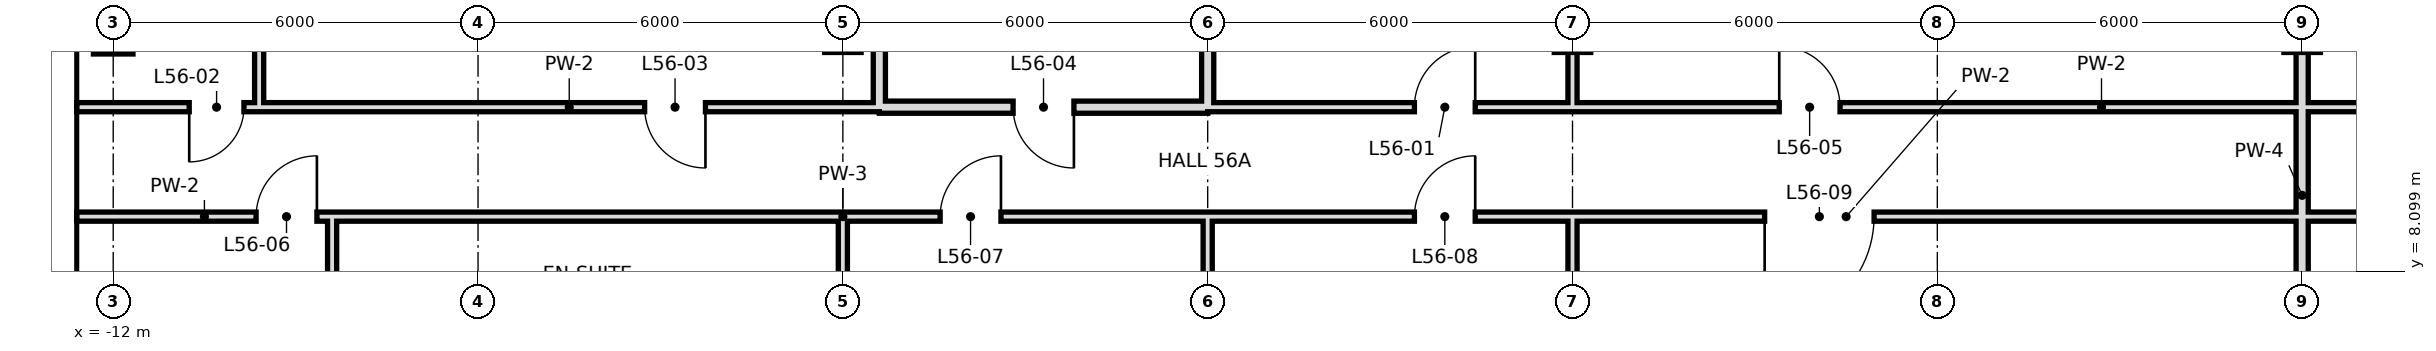
"""IFC4 building model, lengths in metres.
Left out: names, types, materials, properties, quantities, classifications, styles, units other than length and angle.
Written with IfcOpenShell. Run it as: python <this file> out.ifc"""

import sys

from ifc_helpers import new_model, si_unit, direction, frame, frame_2d, origin, origin_2d, place, context, subcontext, project, spatial, rectangle, hollow_rectangle, extrude, element, fill, save


model = new_model("IFC4")
c1 = context("Model", 3, precision=1e-05, world=origin(), true_north=direction((0.0, 1.0)))
c2 = subcontext(c1, "Body", "Model", "MODEL_VIEW")
j1 = project(units=[si_unit("LENGTHUNIT", "METRE"), si_unit("PLANEANGLEUNIT", "RADIAN")], contexts=[c1])
p1 = place(None, origin())
s1 = spatial("IfcSite", under=j1, at=p1, CompositionType="ELEMENT")
p2 = place(p1, origin())
s2 = spatial("IfcBuilding", under=s1, at=p2, CompositionType="ELEMENT")
p3 = place(p2, frame((0.0, 0.0, 239.6)))
s3 = spatial("IfcBuildingStorey", under=s2, at=p3, CompositionType="ELEMENT", Elevation=239.6)
p4 = place(p3, frame((-12.0, 12.0, 0.0), z_axis=(0.0, 0.0, 1.0), x_axis=(1.0, 0.0, 0.0)))
e1 = element("IfcColumn", 1, at=p4, inside=s3, PredefinedType="COLUMN", context=c2, shape_type="SweptSolid", body=[
    extrude(hollow_rectangle(XDim=0.65, YDim=0.65, WallThickness=0.032, at=origin_2d()), origin(), (0.0, 0.0, 1.0), 3.6),
])
p5 = place(p3, frame((-8.4, 6.0, 0.0), z_axis=(0.0, 0.0, 1.0), x_axis=(0.0, 1.0, 0.0)))
e2 = element("IfcWall", 2, at=p5, inside=s3, PredefinedType="PARTITIONING", context=c2, shape_type="SweptSolid", body=[
    extrude(rectangle(XDim=3.0, YDim=0.15, at=frame_2d((1.5, 0.0))), origin(), (0.0, 0.0, 1.0), 3.42),
])
p6 = place(p3, frame((-9.6, 10.8, 0.0), z_axis=(0.0, 0.0, 1.0), x_axis=(0.0, 1.0, 0.0)))
e3 = element("IfcWall", 3, at=p6, inside=s3, PredefinedType="PARTITIONING", context=c2, shape_type="SweptSolid", body=[
    extrude(rectangle(XDim=7.2, YDim=0.15, at=frame_2d((3.6, 0.0))), origin(), (0.0, 0.0, 1.0), 3.42),
])
p7 = place(p3, frame((0.0, 6.0, 0.0), z_axis=(0.0, 0.0, 1.0), x_axis=(0.0, 1.0, 0.0)))
e4 = element("IfcWall", 4, at=p7, inside=s3, PredefinedType="PARTITIONING", context=c2, shape_type="SweptSolid", body=[
    extrude(rectangle(XDim=3.0, YDim=0.15, at=frame_2d((1.5, 0.0))), origin(), (0.0, 0.0, 1.0), 2.72),
])
p8 = place(p3, frame((0.6, 10.8, 0.0), z_axis=(0.0, 0.0, 1.0), x_axis=(0.0, 1.0, 0.0)))
e5 = element("IfcWall", 5, at=p8, inside=s3, PredefinedType="SOLIDWALL", context=c2, shape_type="SweptSolid", body=[
    extrude(rectangle(XDim=7.2, YDim=0.2, at=frame_2d((3.6, 0.0))), origin(), (0.0, 0.0, 1.0), 2.72),
])
p9 = place(p3, frame((12.0, 0.0, 0.0), z_axis=(0.0, 0.0, 1.0), x_axis=(0.0, 1.0, 0.0)))
e6 = element("IfcWall", 6, at=p9, inside=s3, PredefinedType="PARTITIONING", context=c2, shape_type="SweptSolid", body=[
    extrude(rectangle(XDim=9.0, YDim=0.15, at=frame_2d((4.5, 0.0))), origin(), (0.0, 0.0, 1.0), 2.72),
])
p10 = place(p3, frame((12.0, 10.8, 0.0), z_axis=(0.0, 0.0, 1.0), x_axis=(0.0, 1.0, 0.0)))
e7 = element("IfcWall", 7, at=p10, inside=s3, PredefinedType="PARTITIONING", context=c2, shape_type="SweptSolid", body=[
    extrude(rectangle(XDim=7.9, YDim=0.15, at=frame_2d((3.95, 0.0))), origin(), (0.0, 0.0, 1.0), 2.72),
])
p11 = place(p3, frame((24.0, 0.0, 0.0), z_axis=(0.0, 0.0, 1.0), x_axis=(0.0, 1.0, 0.0)))
e8 = element("IfcWall", 8, at=p11, inside=s3, PredefinedType="SOLIDWALL", context=c2, shape_type="SweptSolid", body=[
    extrude(rectangle(XDim=18.7, YDim=0.2, at=frame_2d((9.35, 0.0))), origin(), (0.0, 0.0, 1.0), 2.72),
])
p12 = place(p3, frame((6.0, 10.8, 0.0), z_axis=(0.0, 0.0, 1.0), x_axis=(0.0, 1.0, 0.0)))
e9 = element("IfcWall", 9, at=p12, inside=s3, PredefinedType="SOLIDWALL", context=c2, shape_type="SweptSolid", body=[
    extrude(rectangle(XDim=7.9, YDim=0.2, at=frame_2d((3.95, 0.0))), origin(), (0.0, 0.0, 1.0), 2.72),
])
p13 = place(p3, frame((6.0, -0.6, 0.0), z_axis=(0.0, 0.0, 1.0), x_axis=(0.0, 1.0, 0.0)))
e10 = element("IfcWall", 10, at=p13, inside=s3, PredefinedType="PARTITIONING", context=c2, shape_type="SweptSolid", body=[
    extrude(rectangle(XDim=9.6, YDim=0.15, at=frame_2d((4.8, 0.0))), origin(), (0.0, 0.0, 1.0), 2.72),
])
p14 = place(p3, frame((0.6, 10.8, 0.0), z_axis=(0.0, 0.0, 1.0), x_axis=(1.0, 0.0, 0.0)))
e11 = element("IfcWall", 11, at=p14, inside=s3, PredefinedType="SOLIDWALL", context=c2, shape_type="SweptSolid", body=[
    extrude(rectangle(XDim=5.4, YDim=0.2, at=frame_2d((2.7, 0.0))), origin(), (0.0, 0.0, 1.0), 2.72),
])
p15 = place(p14, frame((2.2, 0.0, 0.0)))
e12 = element("IfcOpeningElement", 12, at=p15, cuts=e11, PredefinedType="OPENING", context=c2, shape_type="SweptSolid", body=[
    extrude(rectangle(XDim=1.0, YDim=2.4, at=frame_2d((0.5, 1.2))), frame((0.0, 0.11, 0.0), z_axis=(0.0, -1.0, 0.0), x_axis=(1.0, 0.0, 0.0)), (0.0, 0.0, 1.0), 0.22),
])
p16 = place(p3, frame((-9.6, 10.8, 0.0), z_axis=(0.0, 0.0, 1.0), x_axis=(1.0, 0.0, 0.0)))
e13 = element("IfcWall", 13, at=p16, inside=s3, PredefinedType="PARTITIONING", context=c2, shape_type="SweptSolid", body=[
    extrude(rectangle(XDim=10.2, YDim=0.15, at=frame_2d((5.1, 0.0))), origin(), (0.0, 0.0, 1.0), 3.42),
])
p17 = place(p16, frame((6.34, 0.0, 0.0)))
e14 = element("IfcOpeningElement", 14, at=p17, cuts=e13, PredefinedType="OPENING", context=c2, shape_type="SweptSolid", body=[
    extrude(rectangle(XDim=1.0, YDim=2.4, at=frame_2d((0.5, 1.2))), frame((0.0, 0.085, 0.0), z_axis=(0.0, -1.0, 0.0), x_axis=(1.0, 0.0, 0.0)), (0.0, 0.0, 1.0), 0.17),
])
p18 = place(p3, frame((6.0, 10.8, 0.0), z_axis=(0.0, 0.0, 1.0), x_axis=(1.0, 0.0, 0.0)))
e15 = element("IfcWall", 15, at=p18, inside=s3, PredefinedType="PARTITIONING", context=c2, shape_type="SweptSolid", body=[
    extrude(rectangle(XDim=29.4, YDim=0.15, at=frame_2d((14.7, 0.0))), origin(), (0.0, 0.0, 1.0), 3.42),
])
p19 = place(p18, frame((3.4, 0.0, 0.0)))
e16 = element("IfcOpeningElement", 16, at=p19, cuts=e15, PredefinedType="OPENING", context=c2, shape_type="SweptSolid", body=[
    extrude(rectangle(XDim=1.0, YDim=2.4, at=frame_2d((0.5, 1.2))), frame((0.0, 0.085, 0.0), z_axis=(0.0, -1.0, 0.0), x_axis=(1.0, 0.0, 0.0)), (0.0, 0.0, 1.0), 0.17),
])
p20 = place(p18, frame((9.4, 0.0, 0.0)))
e17 = element("IfcOpeningElement", 17, at=p20, cuts=e15, PredefinedType="OPENING", context=c2, shape_type="SweptSolid", body=[
    extrude(rectangle(XDim=1.0, YDim=2.4, at=frame_2d((0.5, 1.2))), frame((0.0, 0.085, 0.0), z_axis=(0.0, -1.0, 0.0), x_axis=(1.0, 0.0, 0.0)), (0.0, 0.0, 1.0), 0.17),
])
p21 = place(p18, frame((19.3, 0.0, 0.0)))
e18 = element("IfcOpeningElement", 18, at=p21, cuts=e15, PredefinedType="OPENING", context=c2, shape_type="SweptSolid", body=[
    extrude(rectangle(XDim=1.0, YDim=2.4, at=frame_2d((0.5, 1.2))), frame((0.0, 0.085, 0.0), z_axis=(0.0, -1.0, 0.0), x_axis=(1.0, 0.0, 0.0)), (0.0, 0.0, 1.0), 0.17),
])
p22 = place(p18, frame((25.0, 0.0, 0.0)))
e19 = element("IfcOpeningElement", 19, at=p22, cuts=e15, PredefinedType="OPENING", context=c2, shape_type="SweptSolid", body=[
    extrude(rectangle(XDim=1.0, YDim=2.4, at=frame_2d((0.5, 1.2))), frame((0.0, 0.085, 0.0), z_axis=(0.0, -1.0, 0.0), x_axis=(1.0, 0.0, 0.0)), (0.0, 0.0, 1.0), 0.17),
])
p23 = place(p3, frame((-12.6, 10.8, 0.0), z_axis=(0.0, 0.0, 1.0), x_axis=(1.0, 0.0, 0.0)))
e20 = element("IfcWall", 20, at=p23, inside=s3, PredefinedType="PARTITIONING", context=c2, shape_type="SweptSolid", body=[
    extrude(rectangle(XDim=3.0, YDim=0.15, at=frame_2d((1.5, 0.0))), origin(), (0.0, 0.0, 1.0), 3.42),
])
p24 = place(p23, frame((1.85, 0.0, 0.0)))
e21 = element("IfcOpeningElement", 21, at=p24, cuts=e20, PredefinedType="OPENING", context=c2, shape_type="SweptSolid", body=[
    extrude(rectangle(XDim=0.9, YDim=2.4, at=frame_2d((0.45, 1.2))), frame((0.0, 0.085, 0.0), z_axis=(0.0, -1.0, 0.0), x_axis=(1.0, 0.0, 0.0)), (0.0, 0.0, 1.0), 0.17),
])
p25 = place(p3, frame((-12.6, 9.0, 0.0), z_axis=(0.0, 0.0, 1.0), x_axis=(1.0, 0.0, 0.0)))
e22 = element("IfcWall", 22, at=p25, inside=s3, PredefinedType="PARTITIONING", context=c2, shape_type="SweptSolid", body=[
    extrude(rectangle(XDim=4.2, YDim=0.15, at=frame_2d((2.1, 0.0))), origin(), (0.0, 0.0, 1.0), 3.42),
])
p26 = place(p25, frame((2.95, 0.0, 0.0)))
e23 = element("IfcOpeningElement", 23, at=p26, cuts=e22, PredefinedType="OPENING", context=c2, shape_type="SweptSolid", body=[
    extrude(rectangle(XDim=1.0, YDim=2.4, at=frame_2d((0.5, 1.2))), frame((0.0, 0.085, 0.0), z_axis=(0.0, -1.0, 0.0), x_axis=(1.0, 0.0, 0.0)), (0.0, 0.0, 1.0), 0.17),
])
p27 = place(p3, frame((0.0, 9.0, 0.0), z_axis=(0.0, 0.0, 1.0), x_axis=(1.0, 0.0, 0.0)))
e24 = element("IfcWall", 24, at=p27, inside=s3, PredefinedType="PARTITIONING", context=c2, shape_type="SweptSolid", body=[
    extrude(rectangle(XDim=33.0, YDim=0.15, at=frame_2d((16.5, 0.0))), origin(), (0.0, 0.0, 1.0), 3.42),
])
p28 = place(p27, frame((1.6, 0.0, 0.0)))
e25 = element("IfcOpeningElement", 25, at=p28, cuts=e24, PredefinedType="OPENING", context=c2, shape_type="SweptSolid", body=[
    extrude(rectangle(XDim=1.0, YDim=2.4, at=frame_2d((0.5, 1.2))), frame((0.0, 0.085, 0.0), z_axis=(0.0, -1.0, 0.0), x_axis=(1.0, 0.0, 0.0)), (0.0, 0.0, 1.0), 0.17),
])
p29 = place(p27, frame((9.4, 0.0, 0.0)))
e26 = element("IfcOpeningElement", 26, at=p29, cuts=e24, PredefinedType="OPENING", context=c2, shape_type="SweptSolid", body=[
    extrude(rectangle(XDim=1.0, YDim=2.4, at=frame_2d((0.5, 1.2))), frame((0.0, 0.085, 0.0), z_axis=(0.0, -1.0, 0.0), x_axis=(1.0, 0.0, 0.0)), (0.0, 0.0, 1.0), 0.17),
])
p30 = place(p27, frame((15.16, 0.0, 0.0)))
e27 = element("IfcOpeningElement", 27, at=p30, cuts=e24, PredefinedType="OPENING", context=c2, shape_type="SweptSolid", body=[
    extrude(rectangle(XDim=1.8, YDim=2.4, at=frame_2d((0.9, 1.2))), frame((0.0, 0.085, 0.0), z_axis=(0.0, -1.0, 0.0), x_axis=(1.0, 0.0, 0.0)), (0.0, 0.0, 1.0), 0.17),
])
p31 = place(p27, frame((26.1, 0.0, 0.0)))
e28 = element("IfcOpeningElement", 28, at=p31, cuts=e24, PredefinedType="OPENING", context=c2, shape_type="SweptSolid", body=[
    extrude(rectangle(XDim=1.8, YDim=2.4, at=frame_2d((0.9, 1.2))), frame((0.0, 0.085, 0.0), z_axis=(0.0, -1.0, 0.0), x_axis=(1.0, 0.0, 0.0)), (0.0, 0.0, 1.0), 0.17),
])
p32 = place(p27, frame((30.7, 0.0, 0.0)))
e29 = element("IfcOpeningElement", 29, at=p32, cuts=e24, PredefinedType="OPENING", context=c2, shape_type="SweptSolid", body=[
    extrude(rectangle(XDim=1.0, YDim=2.4, at=frame_2d((0.5, 1.2))), frame((0.0, 0.085, 0.0), z_axis=(0.0, -1.0, 0.0), x_axis=(1.0, 0.0, 0.0)), (0.0, 0.0, 1.0), 0.17),
])
p33 = place(p3, frame((-8.4, 9.0, 0.0), z_axis=(0.0, 0.0, 1.0), x_axis=(1.0, 0.0, 0.0)))
e30 = element("IfcWall", 30, at=p33, inside=s3, PredefinedType="PARTITIONING", context=c2, shape_type="SweptSolid", body=[
    extrude(rectangle(XDim=8.4, YDim=0.15, at=frame_2d((4.2, 0.0))), origin(), (0.0, 0.0, 1.0), 3.42),
])
p34 = place(p19, frame((1.0, 0.0, 0.0), z_axis=(0.0, 0.0, 1.0), x_axis=(-1.0, 0.0, 0.0)))
e31 = element("IfcDoor", 31, at=p34, inside=s3, OperationType="SINGLE_SWING_LEFT", PredefinedType="DOOR", context=c2, shape_type="SweptSolid", body=[
    extrude(rectangle(XDim=1.0, YDim=2.4, at=frame_2d((0.5, 1.2))), frame((0.0, 0.025, 0.0), z_axis=(0.0, -1.0, 0.0), x_axis=(1.0, 0.0, 0.0)), (0.0, 0.0, 1.0), 0.05),
])
fill(e16, e31)
p35 = place(p24, frame((0.9, 0.0, 0.0), z_axis=(0.0, 0.0, 1.0), x_axis=(-1.0, 0.0, 0.0)))
e32 = element("IfcDoor", 32, at=p35, inside=s3, OperationType="SINGLE_SWING_RIGHT", PredefinedType="DOOR", context=c2, shape_type="SweptSolid", body=[
    extrude(rectangle(XDim=0.9, YDim=2.4, at=frame_2d((0.45, 1.2))), frame((0.0, 0.025, 0.0), z_axis=(0.0, -1.0, 0.0), x_axis=(1.0, 0.0, 0.0)), (0.0, 0.0, 1.0), 0.05),
])
fill(e21, e32)
p36 = place(p17, origin())
e33 = element("IfcDoor", 33, at=p36, inside=s3, OperationType="SINGLE_SWING_RIGHT", PredefinedType="DOOR", context=c2, shape_type="SweptSolid", body=[
    extrude(rectangle(XDim=1.0, YDim=2.4, at=frame_2d((0.5, 1.2))), frame((0.0, 0.025, 0.0), z_axis=(0.0, -1.0, 0.0), x_axis=(1.0, 0.0, 0.0)), (0.0, 0.0, 1.0), 0.05),
])
fill(e14, e33)
p37 = place(p15, origin())
e34 = element("IfcDoor", 34, at=p37, inside=s3, OperationType="SINGLE_SWING_RIGHT", PredefinedType="DOOR", context=c2, shape_type="SweptSolid", body=[
    extrude(rectangle(XDim=1.0, YDim=2.4, at=frame_2d((0.5, 1.2))), frame((0.0, 0.025, 0.0), z_axis=(0.0, -1.0, 0.0), x_axis=(1.0, 0.0, 0.0)), (0.0, 0.0, 1.0), 0.05),
])
fill(e12, e34)
p38 = place(p20, origin())
e35 = element("IfcDoor", 35, at=p38, inside=s3, OperationType="SINGLE_SWING_LEFT", PredefinedType="DOOR", context=c2, shape_type="SweptSolid", body=[
    extrude(rectangle(XDim=1.0, YDim=2.4, at=frame_2d((0.5, 1.2))), frame((0.0, 0.025, 0.0), z_axis=(0.0, -1.0, 0.0), x_axis=(1.0, 0.0, 0.0)), (0.0, 0.0, 1.0), 0.05),
])
fill(e17, e35)
p39 = place(p26, frame((1.0, 0.0, 0.0), z_axis=(0.0, 0.0, 1.0), x_axis=(-1.0, 0.0, 0.0)))
e36 = element("IfcDoor", 36, at=p39, inside=s3, OperationType="SINGLE_SWING_LEFT", PredefinedType="DOOR", context=c2, shape_type="SweptSolid", body=[
    extrude(rectangle(XDim=1.0, YDim=2.4, at=frame_2d((0.5, 1.2))), frame((0.0, 0.025, 0.0), z_axis=(0.0, -1.0, 0.0), x_axis=(1.0, 0.0, 0.0)), (0.0, 0.0, 1.0), 0.05),
])
fill(e23, e36)
p40 = place(p28, frame((1.0, 0.0, 0.0), z_axis=(0.0, 0.0, 1.0), x_axis=(-1.0, 0.0, 0.0)))
e37 = element("IfcDoor", 37, at=p40, inside=s3, OperationType="SINGLE_SWING_LEFT", PredefinedType="DOOR", context=c2, shape_type="SweptSolid", body=[
    extrude(rectangle(XDim=1.0, YDim=2.4, at=frame_2d((0.5, 1.2))), frame((0.0, 0.025, 0.0), z_axis=(0.0, -1.0, 0.0), x_axis=(1.0, 0.0, 0.0)), (0.0, 0.0, 1.0), 0.05),
])
fill(e25, e37)
p41 = place(p29, frame((1.0, 0.0, 0.0), z_axis=(0.0, 0.0, 1.0), x_axis=(-1.0, 0.0, 0.0)))
e38 = element("IfcDoor", 38, at=p41, inside=s3, OperationType="SINGLE_SWING_LEFT", PredefinedType="DOOR", context=c2, shape_type="SweptSolid", body=[
    extrude(rectangle(XDim=1.0, YDim=2.4, at=frame_2d((0.5, 1.2))), frame((0.0, 0.025, 0.0), z_axis=(0.0, -1.0, 0.0), x_axis=(1.0, 0.0, 0.0)), (0.0, 0.0, 1.0), 0.05),
])
fill(e26, e38)
p42 = place(p30, frame((1.8, 0.0, 0.0), z_axis=(0.0, 0.0, 1.0), x_axis=(-1.0, 0.0, 0.0)))
e39 = element("IfcDoor", 39, at=p42, inside=s3, OperationType="SINGLE_SWING_RIGHT", PredefinedType="DOOR", context=c2, shape_type="SweptSolid", body=[
    extrude(rectangle(XDim=1.8, YDim=2.4, at=frame_2d((0.9, 1.2))), frame((0.0, 0.025, 0.0), z_axis=(0.0, -1.0, 0.0), x_axis=(1.0, 0.0, 0.0)), (0.0, 0.0, 1.0), 0.05),
])
fill(e27, e39)
save(model, sys.argv[1])
